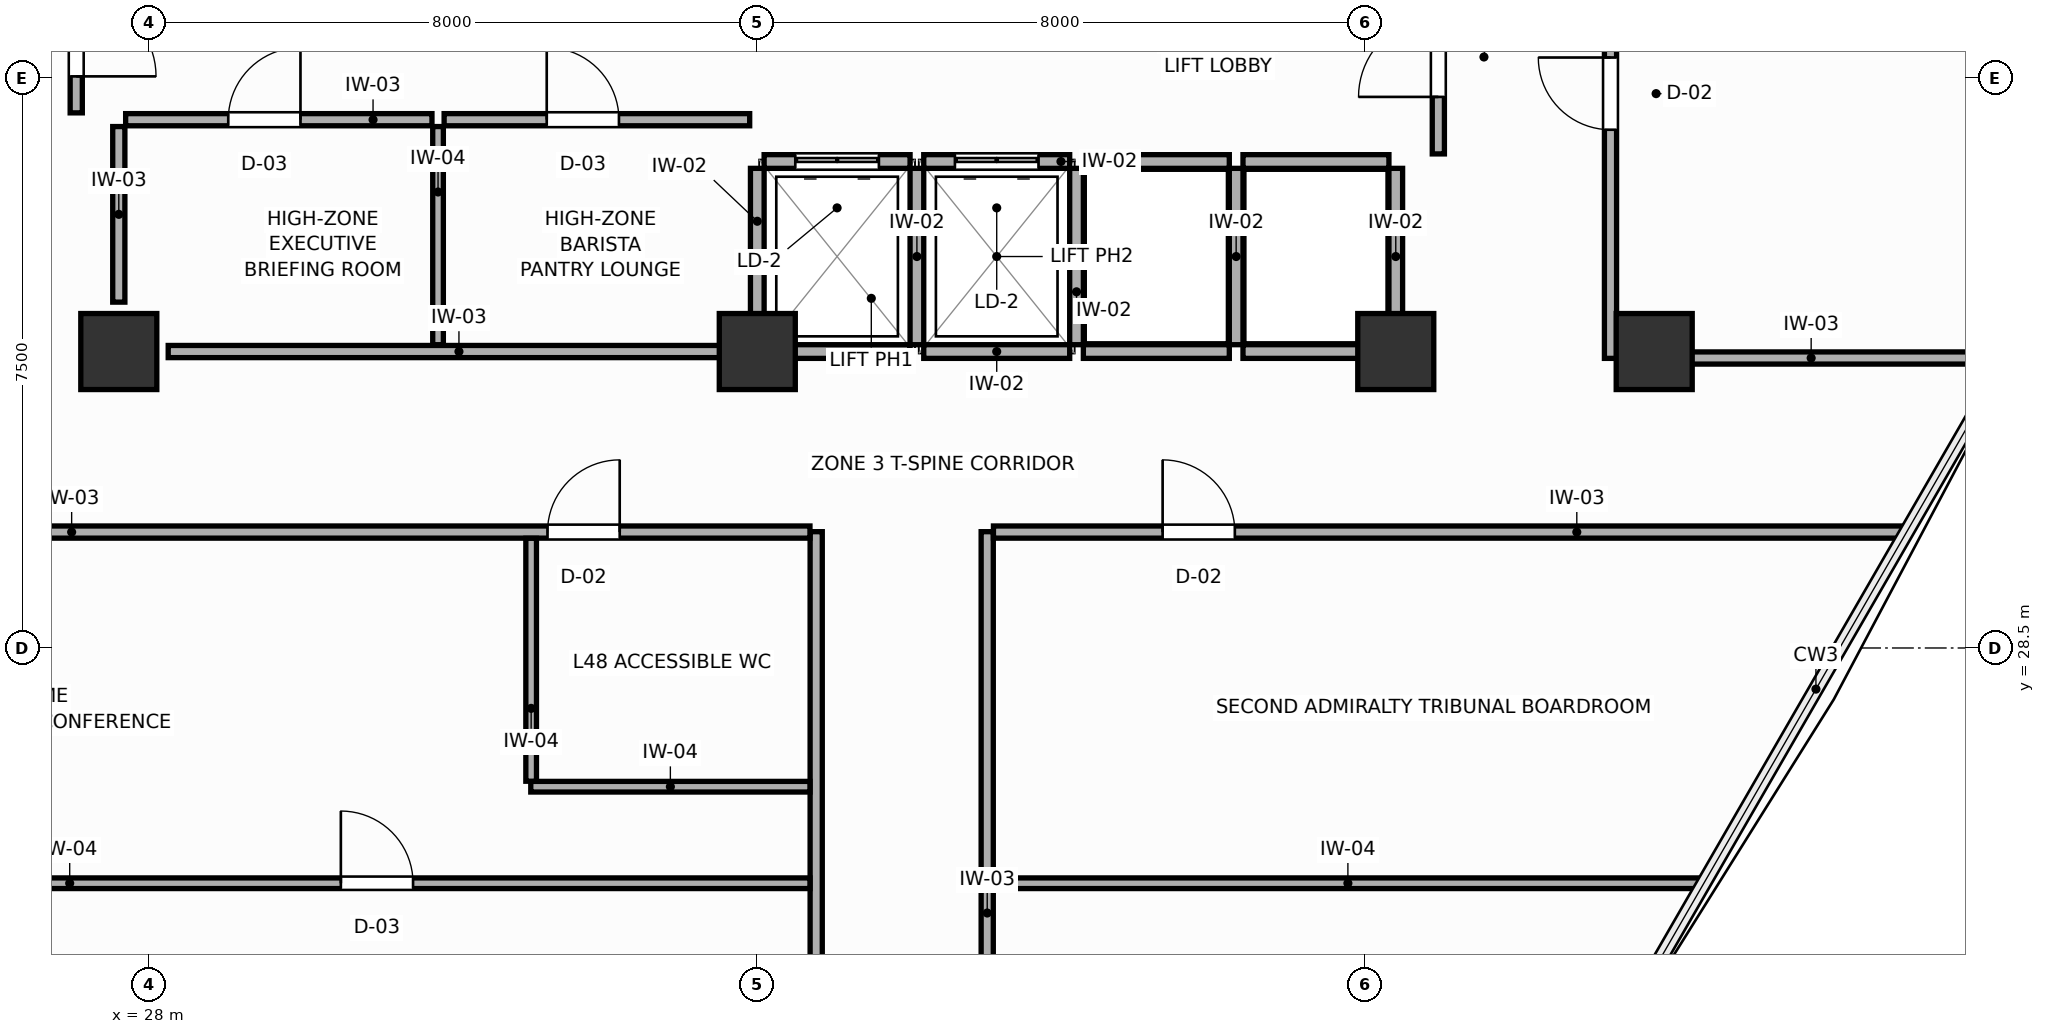
"""IFC4 building model, lengths in metres.
Left out: names, types, materials, properties, quantities, classifications, styles, units other than length and angle.
Written with IfcOpenShell. Run it as: python <this file> out.ifc"""

import sys

from ifc_helpers import new_model, si_unit, direction, frame, frame_2d, origin, origin_2d, place, context, subcontext, project, spatial, rectangle, extrude, source, transform, mapped, element, fill, save


model = new_model("IFC4")
c1 = context("Model", 3, precision=1e-05, world=origin(), true_north=direction((0.0, 1.0)))
c2 = subcontext(c1, "Body", "Model", "MODEL_VIEW")
j1 = project(units=[si_unit("LENGTHUNIT", "METRE"), si_unit("PLANEANGLEUNIT", "RADIAN")], contexts=[c1])
p1 = place(None, origin())
s1 = spatial("IfcSite", under=j1, at=p1, CompositionType="ELEMENT")
p2 = place(p1, origin())
s2 = spatial("IfcBuilding", under=s1, at=p2, CompositionType="ELEMENT")
p3 = place(p2, frame((0.0, 0.0, 186.6)))
s3 = spatial("IfcBuildingStorey", under=s2, at=p3, CompositionType="ELEMENT", Elevation=186.6)
m1 = source(origin(), c2, "Body", "SweptSolid", [
    extrude(rectangle(XDim=1.0, YDim=1.0, at=origin_2d()), origin(), (0.0, 0.0, 1.0), 3.6),
])
for number, where, z_axis, x_axis in (
    (1, (27.6, 32.4, 0.0), (0.0, 0.0, 1.0), (1.0, 0.0, 0.0)),
    (2, (44.4, 32.4, 0.0), (0.0, 0.0, 1.0), (1.0, 0.0, 0.0)),
    (3, (36.0, 32.4, 0.0), (0.0, 0.0, 1.0), (1.0, 0.0, 0.0)),
    (4, (47.8, 32.4, 0.0), (0.0, 0.0, 1.0), (1.0, 0.0, 0.0)),
):
    element("IfcColumn", number, at=place(p3, frame(where, z_axis=z_axis, x_axis=x_axis)), inside=s3, PredefinedType="COLUMN", context=c2, shape_type="MappedRepresentation", body=[
        mapped(m1, transform((0.0, 0.0, 0.0), scale=1.0)),
    ])
p4 = place(p3, frame((36.09, 34.9, 0.0), z_axis=(0.0, 0.0, 1.0), x_axis=(1.0, 0.0, 0.0)))
e5 = element("IfcWall", 5, at=p4, inside=s3, PredefinedType="PARTITIONING", context=c2, shape_type="SweptSolid", body=[
    extrude(rectangle(XDim=1.92, YDim=0.18, at=frame_2d((0.96, 0.0))), origin(), (0.0, 0.0, 1.0), 3.4),
])
p5 = place(p4, frame((0.41, 0.0, 0.0)))
e6 = element("IfcOpeningElement", 6, at=p5, cuts=e5, PredefinedType="OPENING", context=c2, shape_type="SweptSolid", body=[
    extrude(rectangle(XDim=1.1, YDim=2.1, at=frame_2d((0.55, 1.05))), frame((0.0, 0.1, 0.0), z_axis=(0.0, -1.0, 0.0), x_axis=(1.0, 0.0, 0.0)), (0.0, 0.0, 1.0), 0.2),
])
p6 = place(p3, frame((36.09, 32.4, 0.0), z_axis=(0.0, 0.0, 1.0), x_axis=(1.0, 0.0, 0.0)))
e7 = element("IfcWall", 7, at=p6, inside=s3, PredefinedType="PARTITIONING", context=c2, shape_type="SweptSolid", body=[
    extrude(rectangle(XDim=1.92, YDim=0.18, at=frame_2d((0.96, 0.0))), origin(), (0.0, 0.0, 1.0), 2.16),
])
p7 = place(p3, frame((36.0, 32.49, 0.0), z_axis=(0.0, 0.0, 1.0), x_axis=(0.0, 1.0, 0.0)))
e8 = element("IfcWall", 8, at=p7, inside=s3, PredefinedType="PARTITIONING", context=c2, shape_type="SweptSolid", body=[
    extrude(rectangle(XDim=2.32, YDim=0.18, at=frame_2d((1.16, 0.0))), origin(), (0.0, 0.0, 1.0), 3.4),
])
p8 = place(p3, frame((38.19, 34.9, 0.0), z_axis=(0.0, 0.0, 1.0), x_axis=(1.0, 0.0, 0.0)))
e9 = element("IfcWall", 9, at=p8, inside=s3, PredefinedType="PARTITIONING", context=c2, shape_type="SweptSolid", body=[
    extrude(rectangle(XDim=1.92, YDim=0.18, at=frame_2d((0.96, 0.0))), origin(), (0.0, 0.0, 1.0), 3.4),
])
p9 = place(p8, frame((0.41, 0.0, 0.0)))
e10 = element("IfcOpeningElement", 10, at=p9, cuts=e9, PredefinedType="OPENING", context=c2, shape_type="SweptSolid", body=[
    extrude(rectangle(XDim=1.1, YDim=2.1, at=frame_2d((0.55, 1.05))), frame((0.0, 0.1, 0.0), z_axis=(0.0, -1.0, 0.0), x_axis=(1.0, 0.0, 0.0)), (0.0, 0.0, 1.0), 0.2),
])
p10 = place(p3, frame((38.19, 32.4, 0.0), z_axis=(0.0, 0.0, 1.0), x_axis=(1.0, 0.0, 0.0)))
e11 = element("IfcWall", 11, at=p10, inside=s3, PredefinedType="PARTITIONING", context=c2, shape_type="SweptSolid", body=[
    extrude(rectangle(XDim=1.92, YDim=0.18, at=frame_2d((0.96, 0.0))), origin(), (0.0, 0.0, 1.0), 2.16),
])
p11 = place(p3, frame((38.1, 32.49, 0.0), z_axis=(0.0, 0.0, 1.0), x_axis=(0.0, 1.0, 0.0)))
e12 = element("IfcWall", 12, at=p11, inside=s3, PredefinedType="PARTITIONING", context=c2, shape_type="SweptSolid", body=[
    extrude(rectangle(XDim=2.32, YDim=0.18, at=frame_2d((1.16, 0.0))), origin(), (0.0, 0.0, 1.0), 3.4),
])
p12 = place(p3, frame((40.29, 34.9, 0.0), z_axis=(0.0, 0.0, 1.0), x_axis=(1.0, 0.0, 0.0)))
e13 = element("IfcWall", 13, at=p12, inside=s3, PredefinedType="PARTITIONING", context=c2, shape_type="SweptSolid", body=[
    extrude(rectangle(XDim=1.92, YDim=0.18, at=frame_2d((0.96, 0.0))), origin(), (0.0, 0.0, 1.0), 3.4),
])
p13 = place(p3, frame((40.29, 32.4, 0.0), z_axis=(0.0, 0.0, 1.0), x_axis=(1.0, 0.0, 0.0)))
e14 = element("IfcWall", 14, at=p13, inside=s3, PredefinedType="PARTITIONING", context=c2, shape_type="SweptSolid", body=[
    extrude(rectangle(XDim=1.92, YDim=0.18, at=frame_2d((0.96, 0.0))), origin(), (0.0, 0.0, 1.0), 2.16),
])
p14 = place(p3, frame((40.2, 32.49, 0.0), z_axis=(0.0, 0.0, 1.0), x_axis=(0.0, 1.0, 0.0)))
e15 = element("IfcWall", 15, at=p14, inside=s3, PredefinedType="PARTITIONING", context=c2, shape_type="SweptSolid", body=[
    extrude(rectangle(XDim=2.32, YDim=0.18, at=frame_2d((1.16, 0.0))), origin(), (0.0, 0.0, 1.0), 3.4),
])
p15 = place(p3, frame((42.39, 34.9, 0.0), z_axis=(0.0, 0.0, 1.0), x_axis=(1.0, 0.0, 0.0)))
e16 = element("IfcWall", 16, at=p15, inside=s3, PredefinedType="PARTITIONING", context=c2, shape_type="SweptSolid", body=[
    extrude(rectangle(XDim=1.92, YDim=0.18, at=frame_2d((0.96, 0.0))), origin(), (0.0, 0.0, 1.0), 3.4),
])
p16 = place(p3, frame((42.39, 32.4, 0.0), z_axis=(0.0, 0.0, 1.0), x_axis=(1.0, 0.0, 0.0)))
e17 = element("IfcWall", 17, at=p16, inside=s3, PredefinedType="PARTITIONING", context=c2, shape_type="SweptSolid", body=[
    extrude(rectangle(XDim=1.92, YDim=0.18, at=frame_2d((0.96, 0.0))), origin(), (0.0, 0.0, 1.0), 2.16),
])
for number, where, z_axis, x_axis in (
    (18, (42.3, 32.49, 0.0), (0.0, 0.0, 1.0), (0.0, 1.0, 0.0)),
    (19, (44.4, 32.49, 0.0), (0.0, 0.0, 1.0), (0.0, 1.0, 0.0)),
):
    element("IfcWall", number, at=place(p3, frame(where, z_axis=z_axis, x_axis=x_axis)), inside=s3, PredefinedType="PARTITIONING", context=c2, shape_type="SweptSolid", body=[
        extrude(rectangle(XDim=2.32, YDim=0.18, at=frame_2d((1.16, 0.0))), origin(), (0.0, 0.0, 1.0), 3.4),
    ])
p17 = place(p3, frame((28.25, 32.4, 0.0), z_axis=(0.0, 0.0, 1.0), x_axis=(1.0, 0.0, 0.0)))
e20 = element("IfcWall", 20, at=p17, inside=s3, PredefinedType="PARTITIONING", context=c2, shape_type="SweptSolid", body=[
    extrude(rectangle(XDim=7.65, YDim=0.16, at=frame_2d((3.825, 0.0))), origin(), (0.0, 0.0, 1.0), 2.16),
])
p18 = place(p3, frame((27.6, 33.05, 0.0), z_axis=(0.0, 0.0, 1.0), x_axis=(0.0, 1.0, 0.0)))
e21 = element("IfcWall", 21, at=p18, inside=s3, PredefinedType="PARTITIONING", context=c2, shape_type="SweptSolid", body=[
    extrude(rectangle(XDim=2.31, YDim=0.16, at=frame_2d((1.155, 0.0))), origin(), (0.0, 0.0, 1.0), 3.4),
])
p19 = place(p3, frame((31.8, 32.49, 0.0), z_axis=(0.0, 0.0, 1.0), x_axis=(0.0, 1.0, 0.0)))
e22 = element("IfcWall", 22, at=p19, inside=s3, PredefinedType="PARTITIONING", context=c2, shape_type="SweptSolid", body=[
    extrude(rectangle(XDim=2.87, YDim=0.14, at=frame_2d((1.435, 0.0))), origin(), (0.0, 0.0, 1.0), 3.4),
])
p20 = place(p3, frame((27.69, 35.45, 0.0), z_axis=(0.0, 0.0, 1.0), x_axis=(1.0, 0.0, 0.0)))
e23 = element("IfcWall", 23, at=p20, inside=s3, PredefinedType="PARTITIONING", context=c2, shape_type="SweptSolid", body=[
    extrude(rectangle(XDim=4.03, YDim=0.16, at=frame_2d((2.015, 0.0))), origin(), (0.0, 0.0, 1.0), 3.4),
])
p21 = place(p20, frame((1.35, 0.0, 0.0)))
e24 = element("IfcOpeningElement", 24, at=p21, cuts=e23, PredefinedType="OPENING", context=c2, shape_type="SweptSolid", body=[
    extrude(rectangle(XDim=0.95, YDim=2.05, at=frame_2d((0.475, 1.025))), frame((0.0, 0.09, 0.0), z_axis=(0.0, -1.0, 0.0), x_axis=(1.0, 0.0, 0.0)), (0.0, 0.0, 1.0), 0.18),
])
p22 = place(p3, frame((31.88, 35.45, 0.0), z_axis=(0.0, 0.0, 1.0), x_axis=(1.0, 0.0, 0.0)))
e25 = element("IfcWall", 25, at=p22, inside=s3, PredefinedType="PARTITIONING", context=c2, shape_type="SweptSolid", body=[
    extrude(rectangle(XDim=4.02, YDim=0.16, at=frame_2d((2.01, 0.0))), origin(), (0.0, 0.0, 1.0), 3.4),
])
p23 = place(p22, frame((1.35, 0.0, 0.0)))
e26 = element("IfcOpeningElement", 26, at=p23, cuts=e25, PredefinedType="OPENING", context=c2, shape_type="SweptSolid", body=[
    extrude(rectangle(XDim=0.95, YDim=2.05, at=frame_2d((0.475, 1.025))), frame((0.0, 0.09, 0.0), z_axis=(0.0, -1.0, 0.0), x_axis=(1.0, 0.0, 0.0)), (0.0, 0.0, 1.0), 0.18),
])
p24 = place(p3, frame((27.04, 35.54, 0.0), z_axis=(0.0, 0.0, 1.0), x_axis=(0.0, 1.0, 0.0)))
e27 = element("IfcWall", 27, at=p24, inside=s3, PredefinedType="PARTITIONING", context=c2, shape_type="SweptSolid", body=[
    extrude(rectangle(XDim=2.11, YDim=0.16, at=frame_2d((1.055, 0.0))), origin(), (0.0, 0.0, 1.0), 3.4),
])
p25 = place(p24, frame((0.48, 0.0, 0.0)))
e28 = element("IfcOpeningElement", 28, at=p25, cuts=e27, PredefinedType="OPENING", context=c2, shape_type="SweptSolid", body=[
    extrude(rectangle(XDim=1.05, YDim=2.1, at=frame_2d((0.525, 1.05))), frame((0.0, 0.09, 0.0), z_axis=(0.0, -1.0, 0.0), x_axis=(1.0, 0.0, 0.0)), (0.0, 0.0, 1.0), 0.18),
])
p26 = place(p3, frame((44.96, 35.0, 0.0), z_axis=(0.0, 0.0, 1.0), x_axis=(0.0, 1.0, 0.0)))
e29 = element("IfcWall", 29, at=p26, inside=s3, PredefinedType="PARTITIONING", context=c2, shape_type="SweptSolid", body=[
    extrude(rectangle(XDim=2.65, YDim=0.16, at=frame_2d((1.325, 0.0))), origin(), (0.0, 0.0, 1.0), 3.4),
])
p27 = place(p26, frame((0.75, 0.0, 0.0)))
e30 = element("IfcOpeningElement", 30, at=p27, cuts=e29, PredefinedType="OPENING", context=c2, shape_type="SweptSolid", body=[
    extrude(rectangle(XDim=1.05, YDim=2.1, at=frame_2d((0.525, 1.05))), frame((0.0, 0.09, 0.0), z_axis=(0.0, -1.0, 0.0), x_axis=(1.0, 0.0, 0.0)), (0.0, 0.0, 1.0), 0.18),
])
p28 = place(p3, frame((47.225, 32.31, 0.0), z_axis=(0.0, 0.0, 1.0), x_axis=(0.0, 1.0, 0.0)))
e31 = element("IfcWall", 31, at=p28, inside=s3, PredefinedType="PARTITIONING", context=c2, shape_type="SweptSolid", body=[
    extrude(rectangle(XDim=18.969, YDim=0.16, at=frame_2d((9.484, 0.0))), origin(), (0.0, 0.0, 1.0), 3.4),
])
p29 = place(p28, frame((3.008, 0.0, 0.0)))
e32 = element("IfcOpeningElement", 32, at=p29, cuts=e31, PredefinedType="OPENING", context=c2, shape_type="SweptSolid", body=[
    extrude(rectangle(XDim=0.95, YDim=2.05, at=frame_2d((0.475, 1.025))), frame((0.0, 0.09, 0.0), z_axis=(0.0, -1.0, 0.0), x_axis=(1.0, 0.0, 0.0)), (0.0, 0.0, 1.0), 0.18),
])
p30 = place(p28, frame((11.513, 0.0, 0.0)))
e33 = element("IfcOpeningElement", 33, at=p30, cuts=e31, PredefinedType="OPENING", context=c2, shape_type="SweptSolid", body=[
    extrude(rectangle(XDim=0.95, YDim=2.05, at=frame_2d((0.475, 1.025))), frame((0.0, 0.09, 0.0), z_axis=(0.0, -1.0, 0.0), x_axis=(1.0, 0.0, 0.0)), (0.0, 0.0, 1.0), 0.18),
])
p31 = place(p3, frame((36.775, 11.209, 0.0), z_axis=(0.0, 0.0, 1.0), x_axis=(0.0, 1.0, 0.0)))
e34 = element("IfcWall", 34, at=p31, inside=s3, PredefinedType="PARTITIONING", context=c2, shape_type="SweptSolid", body=[
    extrude(rectangle(XDim=18.821, YDim=0.16, at=frame_2d((9.41, 0.0))), origin(), (0.0, 0.0, 1.0), 3.4),
])
p32 = place(p31, frame((3.47, 0.0, 0.0)))
e35 = element("IfcOpeningElement", 35, at=p32, cuts=e34, PredefinedType="OPENING", context=c2, shape_type="SweptSolid", body=[
    extrude(rectangle(XDim=0.95, YDim=2.05, at=frame_2d((0.475, 1.025))), frame((0.0, 0.09, 0.0), z_axis=(0.0, -1.0, 0.0), x_axis=(1.0, 0.0, 0.0)), (0.0, 0.0, 1.0), 0.18),
])
p33 = place(p3, frame((39.025, 12.958, 0.0), z_axis=(0.0, 0.0, 1.0), x_axis=(0.0, 1.0, 0.0)))
e36 = element("IfcWall", 36, at=p33, inside=s3, PredefinedType="PARTITIONING", context=c2, shape_type="SweptSolid", body=[
    extrude(rectangle(XDim=17.072, YDim=0.16, at=frame_2d((8.536, 0.0))), origin(), (0.0, 0.0, 1.0), 3.4),
])
p34 = place(p33, frame((5.908, 0.0, 0.0)))
e37 = element("IfcOpeningElement", 37, at=p34, cuts=e36, PredefinedType="OPENING", context=c2, shape_type="SweptSolid", body=[
    extrude(rectangle(XDim=0.95, YDim=2.05, at=frame_2d((0.475, 1.025))), frame((0.0, 0.09, 0.0), z_axis=(0.0, -1.0, 0.0), x_axis=(1.0, 0.0, 0.0)), (0.0, 0.0, 1.0), 0.18),
])
p35 = place(p3, frame((20.899, 30.025, 0.0), z_axis=(0.0, 0.0, 1.0), x_axis=(1.0, 0.0, 0.0)))
e38 = element("IfcWall", 38, at=p35, inside=s3, PredefinedType="PARTITIONING", context=c2, shape_type="SweptSolid", body=[
    extrude(rectangle(XDim=15.794, YDim=0.16, at=frame_2d((7.897, 0.0))), origin(), (0.0, 0.0, 1.0), 3.4),
])
p36 = place(p35, frame((12.341, 0.0, 0.0)))
e39 = element("IfcOpeningElement", 39, at=p36, cuts=e38, PredefinedType="OPENING", context=c2, shape_type="SweptSolid", body=[
    extrude(rectangle(XDim=0.95, YDim=2.05, at=frame_2d((0.475, 1.025))), frame((0.0, 0.09, 0.0), z_axis=(0.0, -1.0, 0.0), x_axis=(1.0, 0.0, 0.0)), (0.0, 0.0, 1.0), 0.18),
])
p37 = place(p3, frame((39.107, 30.025, 0.0), z_axis=(0.0, 0.0, 1.0), x_axis=(1.0, 0.0, 0.0)))
e40 = element("IfcWall", 40, at=p37, inside=s3, PredefinedType="PARTITIONING", context=c2, shape_type="SweptSolid", body=[
    extrude(rectangle(XDim=11.994, YDim=0.16, at=frame_2d((5.997, 0.0))), origin(), (0.0, 0.0, 1.0), 3.4),
])
p38 = place(p37, frame((2.226, 0.0, 0.0)))
e41 = element("IfcOpeningElement", 41, at=p38, cuts=e40, PredefinedType="OPENING", context=c2, shape_type="SweptSolid", body=[
    extrude(rectangle(XDim=0.95, YDim=2.05, at=frame_2d((0.475, 1.025))), frame((0.0, 0.09, 0.0), z_axis=(0.0, -1.0, 0.0), x_axis=(1.0, 0.0, 0.0)), (0.0, 0.0, 1.0), 0.18),
])
p39 = place(p3, frame((47.307, 32.315, 0.0), z_axis=(0.0, 0.0, 1.0), x_axis=(1.0, 0.0, 0.0)))
e42 = element("IfcWall", 42, at=p39, inside=s3, PredefinedType="PARTITIONING", context=c2, shape_type="SweptSolid", body=[
    extrude(rectangle(XDim=5.116, YDim=0.16, at=frame_2d((2.558, 0.0))), origin(), (0.0, 0.0, 1.0), 2.16),
])
p40 = place(p3, frame((23.567, 25.405, 0.0), z_axis=(0.0, 0.0, 1.0), x_axis=(1.0, 0.0, 0.0)))
e43 = element("IfcWall", 43, at=p40, inside=s3, PredefinedType="PARTITIONING", context=c2, shape_type="SweptSolid", body=[
    extrude(rectangle(XDim=13.126, YDim=0.14, at=frame_2d((6.563, 0.0))), origin(), (0.0, 0.0, 1.0), 3.4),
])
p41 = place(p40, frame((6.955, 0.0, 0.0)))
e44 = element("IfcOpeningElement", 44, at=p41, cuts=e43, PredefinedType="OPENING", context=c2, shape_type="SweptSolid", body=[
    extrude(rectangle(XDim=0.95, YDim=2.05, at=frame_2d((0.475, 1.025))), frame((0.0, 0.08, 0.0), z_axis=(0.0, -1.0, 0.0), x_axis=(1.0, 0.0, 0.0)), (0.0, 0.0, 1.0), 0.16),
])
p42 = place(p3, frame((39.107, 25.405, 0.0), z_axis=(0.0, 0.0, 1.0), x_axis=(1.0, 0.0, 0.0)))
e45 = element("IfcWall", 45, at=p42, inside=s3, PredefinedType="PARTITIONING", context=c2, shape_type="SweptSolid", body=[
    extrude(rectangle(XDim=9.326, YDim=0.14, at=frame_2d((4.663, 0.0))), origin(), (0.0, 0.0, 1.0), 3.4),
])
p43 = place(p3, frame((33.02, 26.675, 0.0), z_axis=(0.0, 0.0, 1.0), x_axis=(1.0, 0.0, 0.0)))
e46 = element("IfcWall", 46, at=p43, inside=s3, PredefinedType="PARTITIONING", context=c2, shape_type="SweptSolid", body=[
    extrude(rectangle(XDim=3.673, YDim=0.14, at=frame_2d((1.836, 0.0))), origin(), (0.0, 0.0, 1.0), 3.4),
])
p44 = place(p3, frame((33.025, 26.747, 0.0), z_axis=(0.0, 0.0, 1.0), x_axis=(0.0, 1.0, 0.0)))
e47 = element("IfcWall", 47, at=p44, inside=s3, PredefinedType="PARTITIONING", context=c2, shape_type="SweptSolid", body=[
    extrude(rectangle(XDim=3.196, YDim=0.14, at=frame_2d((1.598, 0.0))), origin(), (0.0, 0.0, 1.0), 3.4),
])
p45 = place(p5, origin())
e48 = element("IfcDoor", 48, at=p45, inside=s3, OperationType="DOUBLE_DOOR_SLIDING", PredefinedType="DOOR", context=c2, shape_type="SweptSolid", body=[
    extrude(rectangle(XDim=1.1, YDim=2.1, at=frame_2d((0.55, 1.05))), frame((0.0, 0.025, 0.0), z_axis=(0.0, -1.0, 0.0), x_axis=(1.0, 0.0, 0.0)), (0.0, 0.0, 1.0), 0.05),
])
fill(e6, e48)
p46 = place(p9, origin())
e49 = element("IfcDoor", 49, at=p46, inside=s3, OperationType="DOUBLE_DOOR_SLIDING", PredefinedType="DOOR", context=c2, shape_type="SweptSolid", body=[
    extrude(rectangle(XDim=1.1, YDim=2.1, at=frame_2d((0.55, 1.05))), frame((0.0, 0.025, 0.0), z_axis=(0.0, -1.0, 0.0), x_axis=(1.0, 0.0, 0.0)), (0.0, 0.0, 1.0), 0.05),
])
fill(e10, e49)
p47 = place(p21, origin())
e50 = element("IfcDoor", 50, at=p47, inside=s3, OperationType="SINGLE_SWING_RIGHT", PredefinedType="DOOR", context=c2, shape_type="SweptSolid", body=[
    extrude(rectangle(XDim=0.95, YDim=2.05, at=frame_2d((0.475, 1.025))), frame((0.0, 0.025, 0.0), z_axis=(0.0, -1.0, 0.0), x_axis=(1.0, 0.0, 0.0)), (0.0, 0.0, 1.0), 0.05),
])
fill(e24, e50)
p48 = place(p23, origin())
e51 = element("IfcDoor", 51, at=p48, inside=s3, OperationType="SINGLE_SWING_LEFT", PredefinedType="DOOR", context=c2, shape_type="SweptSolid", body=[
    extrude(rectangle(XDim=0.95, YDim=2.05, at=frame_2d((0.475, 1.025))), frame((0.0, 0.025, 0.0), z_axis=(0.0, -1.0, 0.0), x_axis=(1.0, 0.0, 0.0)), (0.0, 0.0, 1.0), 0.05),
])
fill(e26, e51)
p49 = place(p25, frame((1.05, 0.0, 0.0), z_axis=(0.0, 0.0, 1.0), x_axis=(-1.0, 0.0, 0.0)))
e52 = element("IfcDoor", 52, at=p49, inside=s3, OperationType="SINGLE_SWING_RIGHT", PredefinedType="DOOR", context=c2, shape_type="SweptSolid", body=[
    extrude(rectangle(XDim=1.05, YDim=2.1, at=frame_2d((0.525, 1.05))), frame((0.0, 0.025, 0.0), z_axis=(0.0, -1.0, 0.0), x_axis=(1.0, 0.0, 0.0)), (0.0, 0.0, 1.0), 0.05),
])
fill(e28, e52)
p50 = place(p27, origin())
e53 = element("IfcDoor", 53, at=p50, inside=s3, OperationType="SINGLE_SWING_LEFT", PredefinedType="DOOR", context=c2, shape_type="SweptSolid", body=[
    extrude(rectangle(XDim=1.05, YDim=2.1, at=frame_2d((0.525, 1.05))), frame((0.0, 0.025, 0.0), z_axis=(0.0, -1.0, 0.0), x_axis=(1.0, 0.0, 0.0)), (0.0, 0.0, 1.0), 0.05),
])
fill(e30, e53)
p51 = place(p29, origin())
e54 = element("IfcDoor", 54, at=p51, inside=s3, OperationType="SINGLE_SWING_RIGHT", PredefinedType="DOOR", context=c2, shape_type="SweptSolid", body=[
    extrude(rectangle(XDim=0.95, YDim=2.05, at=frame_2d((0.475, 1.025))), frame((0.0, 0.025, 0.0), z_axis=(0.0, -1.0, 0.0), x_axis=(1.0, 0.0, 0.0)), (0.0, 0.0, 1.0), 0.05),
])
fill(e32, e54)
p52 = place(p36, origin())
e55 = element("IfcDoor", 55, at=p52, inside=s3, OperationType="SINGLE_SWING_RIGHT", PredefinedType="DOOR", context=c2, shape_type="SweptSolid", body=[
    extrude(rectangle(XDim=0.95, YDim=2.05, at=frame_2d((0.475, 1.025))), frame((0.0, 0.025, 0.0), z_axis=(0.0, -1.0, 0.0), x_axis=(1.0, 0.0, 0.0)), (0.0, 0.0, 1.0), 0.05),
])
fill(e39, e55)
p53 = place(p38, origin())
e56 = element("IfcDoor", 56, at=p53, inside=s3, OperationType="SINGLE_SWING_LEFT", PredefinedType="DOOR", context=c2, shape_type="SweptSolid", body=[
    extrude(rectangle(XDim=0.95, YDim=2.05, at=frame_2d((0.475, 1.025))), frame((0.0, 0.025, 0.0), z_axis=(0.0, -1.0, 0.0), x_axis=(1.0, 0.0, 0.0)), (0.0, 0.0, 1.0), 0.05),
])
fill(e41, e56)
p54 = place(p41, origin())
e57 = element("IfcDoor", 57, at=p54, inside=s3, OperationType="SINGLE_SWING_LEFT", PredefinedType="DOOR", context=c2, shape_type="SweptSolid", body=[
    extrude(rectangle(XDim=0.95, YDim=2.05, at=frame_2d((0.475, 1.025))), frame((0.0, 0.025, 0.0), z_axis=(0.0, -1.0, 0.0), x_axis=(1.0, 0.0, 0.0)), (0.0, 0.0, 1.0), 0.05),
])
fill(e44, e57)
save(model, sys.argv[1])
